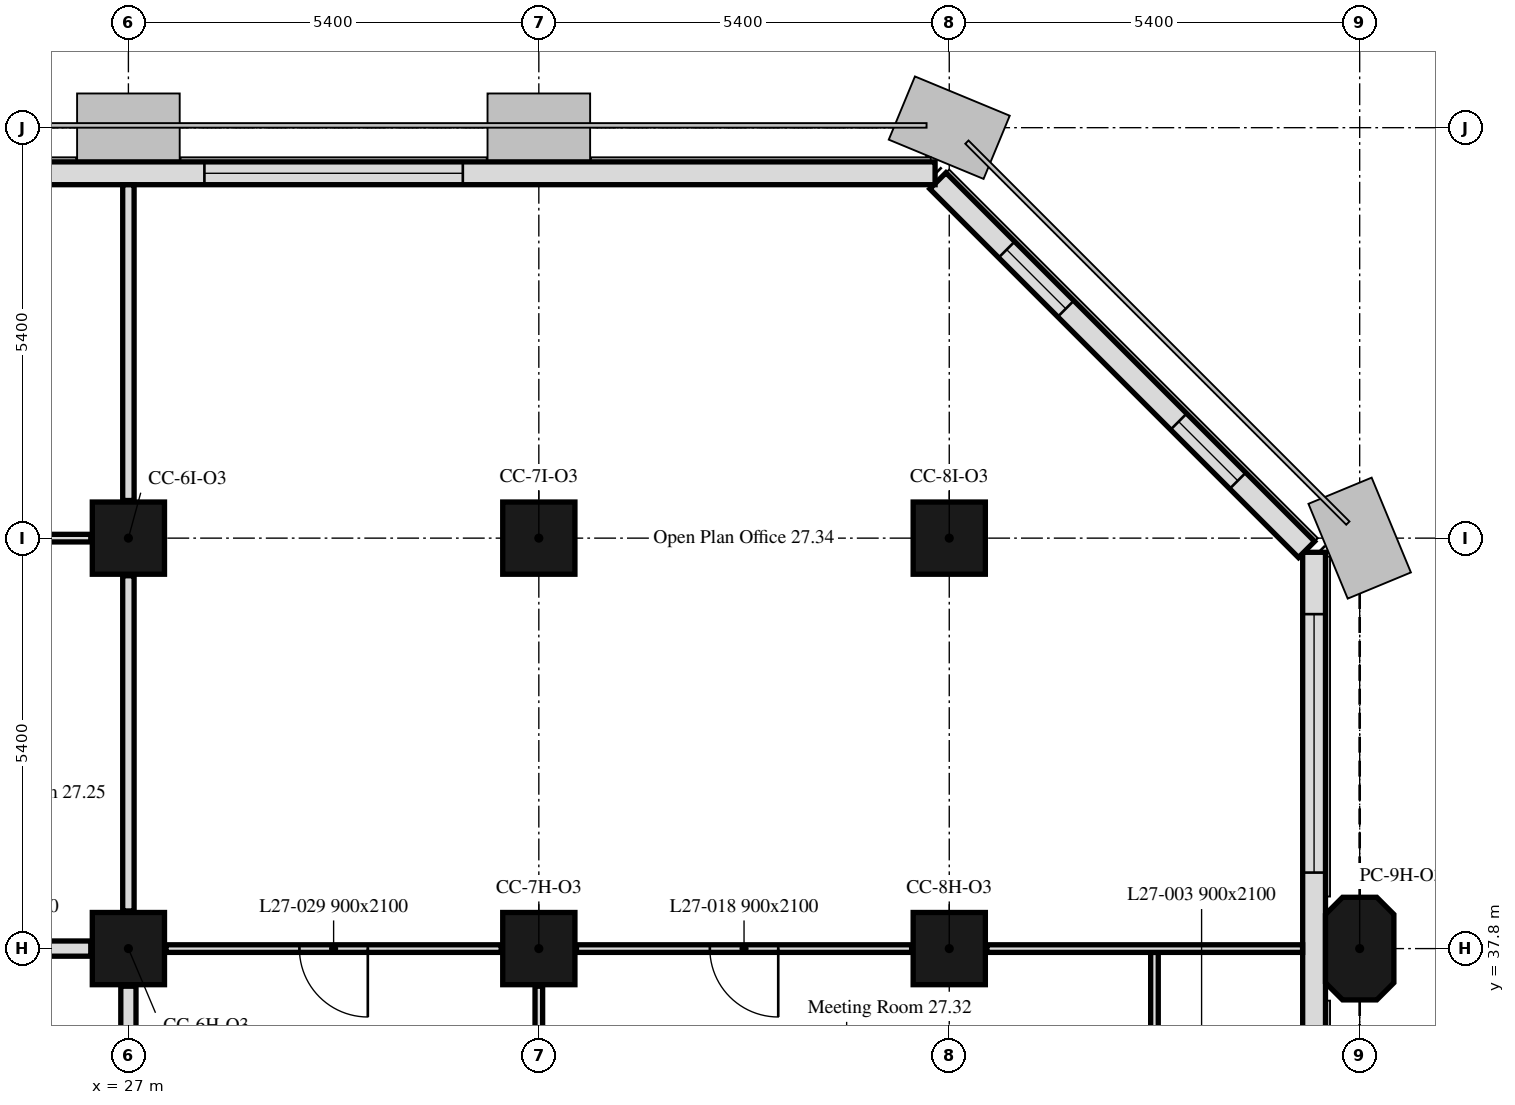
"""IFC4 building model, lengths in metres.
Left out: names, types, materials, properties, quantities, classifications, styles, units other than length and angle.
Written with IfcOpenShell. Run it as: python <this file> out.ifc"""

import sys

from ifc_helpers import new_model, si_unit, direction, frame, frame_2d, origin, origin_2d, place, context, subcontext, project, spatial, polyline, rectangle, outline, extrude, element, fill, save


model = new_model("IFC4")
c1 = context("Model", 3, precision=1e-05, world=origin(), true_north=direction((0.0, 1.0)))
c2 = subcontext(c1, "Body", "Model", "MODEL_VIEW")
j1 = project(units=[si_unit("LENGTHUNIT", "METRE"), si_unit("PLANEANGLEUNIT", "RADIAN")], contexts=[c1])
p1 = place(None, origin())
s1 = spatial("IfcSite", under=j1, at=p1, CompositionType="ELEMENT")
p2 = place(p1, origin())
s2 = spatial("IfcBuilding", under=s1, at=p2, CompositionType="ELEMENT")
p3 = place(p2, frame((0.0, 0.0, 114.4)))
s3 = spatial("IfcBuildingStorey", under=s2, at=p3, CompositionType="ELEMENT", Elevation=114.4)
for number, where, z_axis, x_axis in (
    (1, (27.0, 37.8, 0.0), (0.0, 0.0, 1.0), (1.0, 0.0, 0.0)),
    (2, (32.4, 37.8, 0.0), (0.0, 0.0, 1.0), (1.0, 0.0, 0.0)),
    (3, (37.8, 37.8, 0.0), (0.0, 0.0, 1.0), (1.0, 0.0, 0.0)),
):
    element("IfcColumn", number, at=place(p3, frame(where, z_axis=z_axis, x_axis=x_axis)), inside=s3, PredefinedType="COLUMN", context=c2, shape_type="SweptSolid", body=[
        extrude(rectangle(XDim=0.95, YDim=0.95, at=origin_2d()), origin(), (0.0, 0.0, 1.0), 3.5),
    ])
p4 = place(p3, frame((43.2, 37.8, 0.0), z_axis=(0.0, 0.0, 1.0), x_axis=(0.0, 1.0, 0.0)))
e4 = element("IfcColumn", 4, at=p4, inside=s3, PredefinedType="COLUMN", context=c2, shape_type="SweptSolid", body=[
    extrude(outline(polyline([(-0.45, -0.45), (0.45, -0.45), (0.675, -0.225), (0.675, 0.225), (0.45, 0.45), (-0.45, 0.45), (-0.675, 0.225), (-0.675, -0.225), (-0.45, -0.45)])), origin(), (0.0, 0.0, 1.0), 3.5),
])
for number, where, z_axis, x_axis in (
    (5, (27.0, 43.2, 0.0), (0.0, 0.0, 1.0), (1.0, 0.0, 0.0)),
    (6, (32.4, 43.2, 0.0), (0.0, 0.0, 1.0), (1.0, 0.0, 0.0)),
    (7, (37.8, 43.2, 0.0), (0.0, 0.0, 1.0), (1.0, 0.0, 0.0)),
):
    element("IfcColumn", number, at=place(p3, frame(where, z_axis=z_axis, x_axis=x_axis)), inside=s3, PredefinedType="COLUMN", context=c2, shape_type="SweptSolid", body=[
        extrude(rectangle(XDim=0.95, YDim=0.95, at=origin_2d()), origin(), (0.0, 0.0, 1.0), 3.5),
    ])
p5 = place(p3, frame((42.6, 32.4, 0.0), z_axis=(0.0, 0.0, 1.0), x_axis=(0.0, 1.0, 0.0)))
e8 = element("IfcWall", 8, at=p5, inside=s3, PredefinedType="SOLIDWALL", context=c2, shape_type="SweptSolid", body=[
    extrude(rectangle(XDim=10.614, YDim=0.3, at=frame_2d((5.307, 0.0))), origin(), (0.0, 0.0, 1.0), 3.5),
])
p6 = place(p5, frame((6.4, 0.0, 0.9)))
e9 = element("IfcOpeningElement", 9, at=p6, cuts=e8, PredefinedType="OPENING", context=c2, shape_type="SweptSolid", body=[
    extrude(rectangle(XDim=3.4, YDim=1.7, at=frame_2d((1.7, 0.85))), frame((0.0, 0.16, 0.0), z_axis=(0.0, -1.0, 0.0), x_axis=(1.0, 0.0, 0.0)), (0.0, 0.0, 1.0), 0.32),
])
p7 = place(p3, frame((42.501, 43.051, 0.0), z_axis=(0.0, 0.0, 1.0), x_axis=(-0.707106781187, 0.707106781187, 0.0)))
e10 = element("IfcWall", 10, at=p7, inside=s3, PredefinedType="SOLIDWALL", context=c2, shape_type="SweptSolid", body=[
    extrude(rectangle(XDim=6.86, YDim=0.3, at=frame_2d((3.43, 0.0))), origin(), (0.0, 0.0, 1.0), 3.5),
])
p8 = place(p7, frame((1.28, 0.0, 0.9)))
e11 = element("IfcOpeningElement", 11, at=p8, cuts=e10, PredefinedType="OPENING", context=c2, shape_type="SweptSolid", body=[
    extrude(rectangle(XDim=1.1, YDim=1.7, at=frame_2d((0.55, 0.85))), frame((0.0, 0.16, 0.0), z_axis=(0.0, -1.0, 0.0), x_axis=(1.0, 0.0, 0.0)), (0.0, 0.0, 1.0), 0.32),
])
p9 = place(p7, frame((4.48, 0.0, 0.9)))
e12 = element("IfcOpeningElement", 12, at=p9, cuts=e10, PredefinedType="OPENING", context=c2, shape_type="SweptSolid", body=[
    extrude(rectangle(XDim=1.1, YDim=1.7, at=frame_2d((0.55, 0.85))), frame((0.0, 0.16, 0.0), z_axis=(0.0, -1.0, 0.0), x_axis=(1.0, 0.0, 0.0)), (0.0, 0.0, 1.0), 0.32),
])
p10 = place(p3, frame((37.614, 48.0, 0.0), z_axis=(0.0, 0.0, 1.0), x_axis=(-1.0, 0.0, 0.0)))
e13 = element("IfcWall", 13, at=p10, inside=s3, PredefinedType="SOLIDWALL", context=c2, shape_type="SweptSolid", body=[
    extrude(rectangle(XDim=32.027, YDim=0.3, at=frame_2d((16.014, 0.0))), origin(), (0.0, 0.0, 1.0), 3.5),
])
p11 = place(p10, frame((6.214, 0.0, 0.9)))
e14 = element("IfcOpeningElement", 14, at=p11, cuts=e13, PredefinedType="OPENING", context=c2, shape_type="SweptSolid", body=[
    extrude(rectangle(XDim=3.4, YDim=1.7, at=frame_2d((1.7, 0.85))), frame((0.0, 0.16, 0.0), z_axis=(0.0, -1.0, 0.0), x_axis=(1.0, 0.0, 0.0)), (0.0, 0.0, 1.0), 0.32),
])
p12 = place(p10, frame((17.014, 0.0, 0.9)))
e15 = element("IfcOpeningElement", 15, at=p12, cuts=e13, PredefinedType="OPENING", context=c2, shape_type="SweptSolid", body=[
    extrude(rectangle(XDim=3.4, YDim=1.7, at=frame_2d((1.7, 0.85))), frame((0.0, 0.16, 0.0), z_axis=(0.0, -1.0, 0.0), x_axis=(1.0, 0.0, 0.0)), (0.0, 0.0, 1.0), 0.32),
])
p13 = place(p10, frame((27.814, 0.0, 0.9)))
e16 = element("IfcOpeningElement", 16, at=p13, cuts=e13, PredefinedType="OPENING", context=c2, shape_type="SweptSolid", body=[
    extrude(rectangle(XDim=3.4, YDim=1.7, at=frame_2d((1.7, 0.85))), frame((0.0, 0.16, 0.0), z_axis=(0.0, -1.0, 0.0), x_axis=(1.0, 0.0, 0.0)), (0.0, 0.0, 1.0), 0.32),
])
p14 = place(p3, frame((27.0, 35.2, 0.0), z_axis=(0.0, 0.0, 1.0), x_axis=(0.0, 1.0, 0.0)))
e17 = element("IfcWall", 17, at=p14, inside=s3, PredefinedType="PARTITIONING", context=c2, shape_type="SweptSolid", body=[
    extrude(rectangle(XDim=2.105, YDim=0.2, at=frame_2d((1.052, 0.0))), origin(), (0.0, 0.0, 1.0), 2.75),
])
p15 = place(p3, frame((26.505, 37.8, 0.0), z_axis=(0.0, 0.0, 1.0), x_axis=(-1.0, 0.0, 0.0)))
e18 = element("IfcWall", 18, at=p15, inside=s3, PredefinedType="PARTITIONING", context=c2, shape_type="SweptSolid", body=[
    extrude(rectangle(XDim=2.105, YDim=0.2, at=frame_2d((1.052, 0.0))), origin(), (0.0, 0.0, 1.0), 3.5),
])
p16 = place(p3, frame((26.505, 43.2, 0.0), z_axis=(0.0, 0.0, 1.0), x_axis=(-1.0, 0.0, 0.0)))
e19 = element("IfcWall", 19, at=p16, inside=s3, PredefinedType="PARTITIONING", context=c2, shape_type="SweptSolid", body=[
    extrude(rectangle(XDim=4.41, YDim=0.1, at=frame_2d((2.205, 0.0))), origin(), (0.0, 0.0, 1.0), 3.5),
])
p17 = place(p16, frame((1.755, 0.0, 0.0)))
e20 = element("IfcOpeningElement", 20, at=p17, cuts=e19, PredefinedType="OPENING", context=c2, shape_type="SweptSolid", body=[
    extrude(rectangle(XDim=0.9, YDim=2.1, at=frame_2d((0.45, 1.05))), frame((0.0, 0.05, 0.0), z_axis=(0.0, -1.0, 0.0), x_axis=(1.0, 0.0, 0.0)), (0.0, 0.0, 1.0), 0.1),
])
p18 = place(p3, frame((27.0, 38.295, 0.0), z_axis=(0.0, 0.0, 1.0), x_axis=(0.0, 1.0, 0.0)))
e21 = element("IfcWall", 21, at=p18, inside=s3, PredefinedType="PARTITIONING", context=c2, shape_type="SweptSolid", body=[
    extrude(rectangle(XDim=4.41, YDim=0.15, at=frame_2d((2.205, 0.0))), origin(), (0.0, 0.0, 1.0), 2.75),
])
p19 = place(p3, frame((27.0, 43.695, 0.0), z_axis=(0.0, 0.0, 1.0), x_axis=(0.0, 1.0, 0.0)))
e22 = element("IfcWall", 22, at=p19, inside=s3, PredefinedType="PARTITIONING", context=c2, shape_type="SweptSolid", body=[
    extrude(rectangle(XDim=4.154, YDim=0.15, at=frame_2d((2.077, 0.0))), origin(), (0.0, 0.0, 1.0), 2.75),
])
p20 = place(p3, frame((32.4, 35.175, 0.0), z_axis=(0.0, 0.0, 1.0), x_axis=(0.0, 1.0, 0.0)))
e23 = element("IfcWall", 23, at=p20, inside=s3, PredefinedType="PARTITIONING", context=c2, shape_type="SweptSolid", body=[
    extrude(rectangle(XDim=2.13, YDim=0.1, at=frame_2d((1.065, 0.0))), origin(), (0.0, 0.0, 1.0), 2.75),
])
p21 = place(p3, frame((31.905, 37.8, 0.0), z_axis=(0.0, 0.0, 1.0), x_axis=(-1.0, 0.0, 0.0)))
e24 = element("IfcWall", 24, at=p21, inside=s3, PredefinedType="PARTITIONING", context=c2, shape_type="SweptSolid", body=[
    extrude(rectangle(XDim=4.41, YDim=0.1, at=frame_2d((2.205, 0.0))), origin(), (0.0, 0.0, 1.0), 3.5),
])
p22 = place(p21, frame((1.755, 0.0, 0.0)))
e25 = element("IfcOpeningElement", 25, at=p22, cuts=e24, PredefinedType="OPENING", context=c2, shape_type="SweptSolid", body=[
    extrude(rectangle(XDim=0.9, YDim=2.1, at=frame_2d((0.45, 1.05))), frame((0.0, 0.05, 0.0), z_axis=(0.0, -1.0, 0.0), x_axis=(1.0, 0.0, 0.0)), (0.0, 0.0, 1.0), 0.1),
])
p23 = place(p3, frame((40.5, 35.175, 0.0), z_axis=(0.0, 0.0, 1.0), x_axis=(0.0, 1.0, 0.0)))
e26 = element("IfcWall", 26, at=p23, inside=s3, PredefinedType="PARTITIONING", context=c2, shape_type="SweptSolid", body=[
    extrude(rectangle(XDim=2.575, YDim=0.1, at=frame_2d((1.288, 0.0))), origin(), (0.0, 0.0, 1.0), 3.5),
])
p24 = place(p3, frame((37.305, 37.8, 0.0), z_axis=(0.0, 0.0, 1.0), x_axis=(-1.0, 0.0, 0.0)))
e27 = element("IfcWall", 27, at=p24, inside=s3, PredefinedType="PARTITIONING", context=c2, shape_type="SweptSolid", body=[
    extrude(rectangle(XDim=4.41, YDim=0.1, at=frame_2d((2.205, 0.0))), origin(), (0.0, 0.0, 1.0), 3.5),
])
p25 = place(p24, frame((1.755, 0.0, 0.0)))
e28 = element("IfcOpeningElement", 28, at=p25, cuts=e27, PredefinedType="OPENING", context=c2, shape_type="SweptSolid", body=[
    extrude(rectangle(XDim=0.9, YDim=2.1, at=frame_2d((0.45, 1.05))), frame((0.0, 0.05, 0.0), z_axis=(0.0, -1.0, 0.0), x_axis=(1.0, 0.0, 0.0)), (0.0, 0.0, 1.0), 0.1),
])
p26 = place(p3, frame((42.449, 37.8, 0.0), z_axis=(0.0, 0.0, 1.0), x_axis=(-1.0, 0.0, 0.0)))
e29 = element("IfcWall", 29, at=p26, inside=s3, PredefinedType="PARTITIONING", context=c2, shape_type="SweptSolid", body=[
    extrude(rectangle(XDim=4.154, YDim=0.1, at=frame_2d((2.077, 0.0))), origin(), (0.0, 0.0, 1.0), 3.5),
])
p27 = place(p6, origin())
e30 = element("IfcWindow", 30, at=p27, inside=s3, PartitioningType="SINGLE_PANEL", PredefinedType="WINDOW", context=c2, shape_type="SweptSolid", body=[
    extrude(rectangle(XDim=3.4, YDim=1.7, at=frame_2d((1.7, 0.85))), frame((0.0, 0.03, 0.0), z_axis=(0.0, -1.0, 0.0), x_axis=(1.0, 0.0, 0.0)), (0.0, 0.0, 1.0), 0.06),
])
fill(e9, e30)
p28 = place(p8, origin())
e31 = element("IfcWindow", 31, at=p28, inside=s3, PartitioningType="SINGLE_PANEL", PredefinedType="WINDOW", context=c2, shape_type="SweptSolid", body=[
    extrude(rectangle(XDim=1.1, YDim=1.7, at=frame_2d((0.55, 0.85))), frame((0.0, 0.03, 0.0), z_axis=(0.0, -1.0, 0.0), x_axis=(1.0, 0.0, 0.0)), (0.0, 0.0, 1.0), 0.06),
])
fill(e11, e31)
p29 = place(p9, origin())
e32 = element("IfcWindow", 32, at=p29, inside=s3, PartitioningType="SINGLE_PANEL", PredefinedType="WINDOW", context=c2, shape_type="SweptSolid", body=[
    extrude(rectangle(XDim=1.1, YDim=1.7, at=frame_2d((0.55, 0.85))), frame((0.0, 0.03, 0.0), z_axis=(0.0, -1.0, 0.0), x_axis=(1.0, 0.0, 0.0)), (0.0, 0.0, 1.0), 0.06),
])
fill(e12, e32)
p30 = place(p11, origin())
e33 = element("IfcWindow", 33, at=p30, inside=s3, PartitioningType="SINGLE_PANEL", PredefinedType="WINDOW", context=c2, shape_type="SweptSolid", body=[
    extrude(rectangle(XDim=3.4, YDim=1.7, at=frame_2d((1.7, 0.85))), frame((0.0, 0.03, 0.0), z_axis=(0.0, -1.0, 0.0), x_axis=(1.0, 0.0, 0.0)), (0.0, 0.0, 1.0), 0.06),
])
fill(e14, e33)
p31 = place(p25, origin())
e34 = element("IfcDoor", 34, at=p31, inside=s3, OperationType="SINGLE_SWING_RIGHT", PredefinedType="DOOR", context=c2, shape_type="SweptSolid", body=[
    extrude(rectangle(XDim=0.9, YDim=2.1, at=frame_2d((0.45, 1.05))), frame((0.0, 0.025, 0.0), z_axis=(0.0, -1.0, 0.0), x_axis=(1.0, 0.0, 0.0)), (0.0, 0.0, 1.0), 0.05),
])
fill(e28, e34)
p32 = place(p22, origin())
e35 = element("IfcDoor", 35, at=p32, inside=s3, OperationType="SINGLE_SWING_LEFT", PredefinedType="DOOR", context=c2, shape_type="SweptSolid", body=[
    extrude(rectangle(XDim=0.9, YDim=2.1, at=frame_2d((0.45, 1.05))), frame((0.0, 0.025, 0.0), z_axis=(0.0, -1.0, 0.0), x_axis=(1.0, 0.0, 0.0)), (0.0, 0.0, 1.0), 0.05),
])
fill(e25, e35)
save(model, sys.argv[1])
